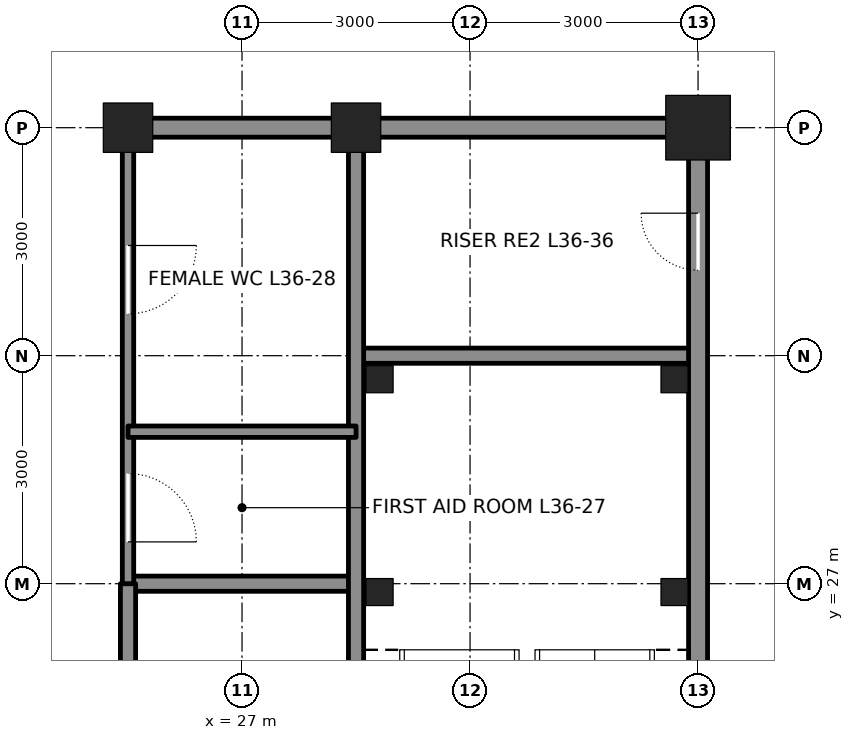
"""IFC4 building model, lengths in metres.
Left out: names, types, materials, properties, quantities, classifications, styles, units other than length and angle.
Written with IfcOpenShell. Run it as: python <this file> out.ifc"""

import sys

from ifc_helpers import new_model, si_unit, direction, frame, frame_2d, origin, origin_2d, place, context, subcontext, project, spatial, rectangle, hollow_rectangle, extrude, element, fill, save


model = new_model("IFC4")
c1 = context("Model", 3, precision=1e-05, world=origin(), true_north=direction((0.0, 1.0)))
c2 = subcontext(c1, "Body", "Model", "MODEL_VIEW")
j1 = project(units=[si_unit("LENGTHUNIT", "METRE"), si_unit("PLANEANGLEUNIT", "RADIAN")], contexts=[c1])
p1 = place(None, origin())
s1 = spatial("IfcSite", under=j1, at=p1, CompositionType="ELEMENT")
p2 = place(p1, origin())
s2 = spatial("IfcBuilding", under=s1, at=p2, CompositionType="ELEMENT")
p3 = place(p2, frame((0.0, 0.0, 165.6)))
s3 = spatial("IfcBuildingStorey", under=s2, at=p3, CompositionType="ELEMENT", Elevation=165.6)
for number, where, z_axis, x_axis in (
    (1, (25.5, 33.0, 0.0), (0.0, 0.0, 1.0), (1.0, 0.0, 0.0)),
    (2, (28.5, 33.0, 0.0), (0.0, 0.0, 1.0), (1.0, 0.0, 0.0)),
):
    element("IfcColumn", number, at=place(p3, frame(where, z_axis=z_axis, x_axis=x_axis)), inside=s3, PredefinedType="COLUMN", context=c2, shape_type="SweptSolid", body=[
        extrude(hollow_rectangle(XDim=0.65, YDim=0.65, WallThickness=0.065, at=origin_2d()), origin(), (0.0, 0.0, 1.0), 4.2),
    ])
p4 = place(p3, frame((33.0, 33.0, 0.0), z_axis=(0.0, 0.0, 1.0), x_axis=(1.0, 0.0, 0.0)))
e3 = element("IfcColumn", 3, at=p4, inside=s3, PredefinedType="COLUMN", context=c2, shape_type="SweptSolid", body=[
    extrude(hollow_rectangle(XDim=0.85, YDim=0.85, WallThickness=0.085, at=origin_2d()), origin(), (0.0, 0.0, 1.0), 4.2),
])
p5 = place(p3, frame((25.5, 27.0, 0.0), z_axis=(0.0, 0.0, 1.0), x_axis=(1.0, 0.0, 0.0)))
e4 = element("IfcWall", 4, at=p5, inside=s3, PredefinedType="SOLIDWALL", context=c2, shape_type="SweptSolid", body=[
    extrude(rectangle(XDim=3.0, YDim=0.2, at=frame_2d((1.5, 0.0))), origin(), (0.0, 0.0, 1.0), 4.04),
])
p6 = place(p3, frame((28.5, 30.0, 0.0), z_axis=(0.0, 0.0, 1.0), x_axis=(1.0, 0.0, 0.0)))
e5 = element("IfcWall", 5, at=p6, inside=s3, PredefinedType="SOLIDWALL", context=c2, shape_type="SweptSolid", body=[
    extrude(rectangle(XDim=4.5, YDim=0.2, at=frame_2d((2.25, 0.0))), origin(), (0.0, 0.0, 1.0), 4.04),
])
p7 = place(p3, frame((25.75, 33.0, 0.0), z_axis=(0.0, 0.0, 1.0), x_axis=(1.0, 0.0, 0.0)))
e6 = element("IfcWall", 6, at=p7, inside=s3, PredefinedType="SOLIDWALL", context=c2, shape_type="SweptSolid", body=[
    extrude(rectangle(XDim=2.5, YDim=0.25, at=frame_2d((1.25, 0.0))), origin(), (0.0, 0.0, 1.0), 3.181),
])
p8 = place(p3, frame((28.75, 33.0, 0.0), z_axis=(0.0, 0.0, 1.0), x_axis=(1.0, 0.0, 0.0)))
e7 = element("IfcWall", 7, at=p8, inside=s3, PredefinedType="SOLIDWALL", context=c2, shape_type="SweptSolid", body=[
    extrude(rectangle(XDim=4.0, YDim=0.25, at=frame_2d((2.0, 0.0))), origin(), (0.0, 0.0, 1.0), 3.181),
])
p9 = place(p3, frame((25.5, 15.0, 0.0), z_axis=(0.0, 0.0, 1.0), x_axis=(0.0, 1.0, 0.0)))
e8 = element("IfcWall", 8, at=p9, inside=s3, PredefinedType="SOLIDWALL", context=c2, shape_type="SweptSolid", body=[
    extrude(rectangle(XDim=12.0, YDim=0.2, at=frame_2d((6.0, 0.0))), origin(), (0.0, 0.0, 1.0), 3.064),
])
p10 = place(p3, frame((25.5, 27.0, 0.0), z_axis=(0.0, 0.0, 1.0), x_axis=(0.0, 1.0, 0.0)))
e9 = element("IfcWall", 9, at=p10, inside=s3, PredefinedType="PARTITIONING", context=c2, shape_type="SweptSolid", body=[
    extrude(rectangle(XDim=5.75, YDim=0.15, at=frame_2d((2.875, 0.0))), origin(), (0.0, 0.0, 1.0), 3.064),
])
p11 = place(p10, frame((0.55, 0.0, 0.0)))
e10 = element("IfcOpeningElement", 10, at=p11, cuts=e9, PredefinedType="OPENING", context=c2, shape_type="SweptSolid", body=[
    extrude(rectangle(XDim=0.9, YDim=2.1, at=frame_2d((0.45, 1.05))), frame((0.0, 0.085, 0.0), z_axis=(0.0, -1.0, 0.0), x_axis=(1.0, 0.0, 0.0)), (0.0, 0.0, 1.0), 0.17),
])
p12 = place(p10, frame((3.55, 0.0, 0.0)))
e11 = element("IfcOpeningElement", 11, at=p12, cuts=e9, PredefinedType="OPENING", context=c2, shape_type="SweptSolid", body=[
    extrude(rectangle(XDim=0.9, YDim=2.1, at=frame_2d((0.45, 1.05))), frame((0.0, 0.085, 0.0), z_axis=(0.0, -1.0, 0.0), x_axis=(1.0, 0.0, 0.0)), (0.0, 0.0, 1.0), 0.17),
])
p13 = place(p3, frame((28.5, 24.25, 0.0), z_axis=(0.0, 0.0, 1.0), x_axis=(0.0, 1.0, 0.0)))
e12 = element("IfcWall", 12, at=p13, inside=s3, PredefinedType="SOLIDWALL", context=c2, shape_type="SweptSolid", body=[
    extrude(rectangle(XDim=8.5, YDim=0.2, at=frame_2d((4.25, 0.0))), origin(), (0.0, 0.0, 1.0), 3.113),
])
p14 = place(p3, frame((33.0, 24.25, 0.0), z_axis=(0.0, 0.0, 1.0), x_axis=(0.0, 1.0, 0.0)))
e13 = element("IfcWall", 13, at=p14, inside=s3, PredefinedType="SOLIDWALL", context=c2, shape_type="SweptSolid", body=[
    extrude(rectangle(XDim=8.5, YDim=0.25, at=frame_2d((4.25, 0.0))), origin(), (0.0, 0.0, 1.0), 3.113),
])
p15 = place(p14, frame((6.875, 0.0, 0.0)))
e14 = element("IfcOpeningElement", 14, at=p15, cuts=e13, PredefinedType="OPENING", context=c2, shape_type="SweptSolid", body=[
    extrude(rectangle(XDim=0.75, YDim=2.1, at=frame_2d((0.375, 1.05))), frame((0.0, 0.135, 0.0), z_axis=(0.0, -1.0, 0.0), x_axis=(1.0, 0.0, 0.0)), (0.0, 0.0, 1.0), 0.27),
])
p16 = place(p3, frame((25.5, 29.0, 0.0), z_axis=(0.0, 0.0, 1.0), x_axis=(1.0, 0.0, 0.0)))
e15 = element("IfcWall", 15, at=p16, inside=s3, PredefinedType="PARTITIONING", context=c2, shape_type="SweptSolid", body=[
    extrude(rectangle(XDim=3.0, YDim=0.15, at=frame_2d((1.5, 0.0))), origin(), (0.0, 0.0, 1.0), 4.04),
])
for number, where, z_axis, x_axis in (
    (16, (28.81, 29.69, 0.0), (0.0, 0.0, 1.0), (1.0, 0.0, 0.0)),
    (17, (32.69, 29.69, 0.0), (0.0, 0.0, 1.0), (1.0, 0.0, 0.0)),
    (18, (28.81, 26.89, 0.0), (0.0, 0.0, 1.0), (1.0, 0.0, 0.0)),
    (19, (32.69, 26.89, 0.0), (0.0, 0.0, 1.0), (1.0, 0.0, 0.0)),
):
    element("IfcColumn", number, at=place(p3, frame(where, z_axis=z_axis, x_axis=x_axis)), inside=s3, PredefinedType="COLUMN", context=c2, shape_type="SweptSolid", body=[
        extrude(hollow_rectangle(XDim=0.356, YDim=0.356, WallThickness=0.015, at=origin_2d()), origin(), (0.0, 0.0, 1.0), 4.2),
    ])
p17 = place(p15, origin())
e20 = element("IfcDoor", 20, at=p17, inside=s3, OperationType="SINGLE_SWING_RIGHT", PredefinedType="DOOR", context=c2, shape_type="SweptSolid", body=[
    extrude(rectangle(XDim=0.75, YDim=2.1, at=frame_2d((0.375, 1.05))), frame((0.0, 0.025, 0.0), z_axis=(0.0, -1.0, 0.0), x_axis=(1.0, 0.0, 0.0)), (0.0, 0.0, 1.0), 0.05),
])
fill(e14, e20)
p18 = place(p11, frame((0.9, 0.0, 0.0), z_axis=(0.0, 0.0, 1.0), x_axis=(-1.0, 0.0, 0.0)))
e21 = element("IfcDoor", 21, at=p18, inside=s3, OperationType="SINGLE_SWING_RIGHT", PredefinedType="DOOR", context=c2, shape_type="SweptSolid", body=[
    extrude(rectangle(XDim=0.9, YDim=2.1, at=frame_2d((0.45, 1.05))), frame((0.0, 0.025, 0.0), z_axis=(0.0, -1.0, 0.0), x_axis=(1.0, 0.0, 0.0)), (0.0, 0.0, 1.0), 0.05),
])
fill(e10, e21)
p19 = place(p12, frame((0.9, 0.0, 0.0), z_axis=(0.0, 0.0, 1.0), x_axis=(-1.0, 0.0, 0.0)))
e22 = element("IfcDoor", 22, at=p19, inside=s3, OperationType="SINGLE_SWING_LEFT", PredefinedType="DOOR", context=c2, shape_type="SweptSolid", body=[
    extrude(rectangle(XDim=0.9, YDim=2.1, at=frame_2d((0.45, 1.05))), frame((0.0, 0.025, 0.0), z_axis=(0.0, -1.0, 0.0), x_axis=(1.0, 0.0, 0.0)), (0.0, 0.0, 1.0), 0.05),
])
fill(e11, e22)
save(model, sys.argv[1])
